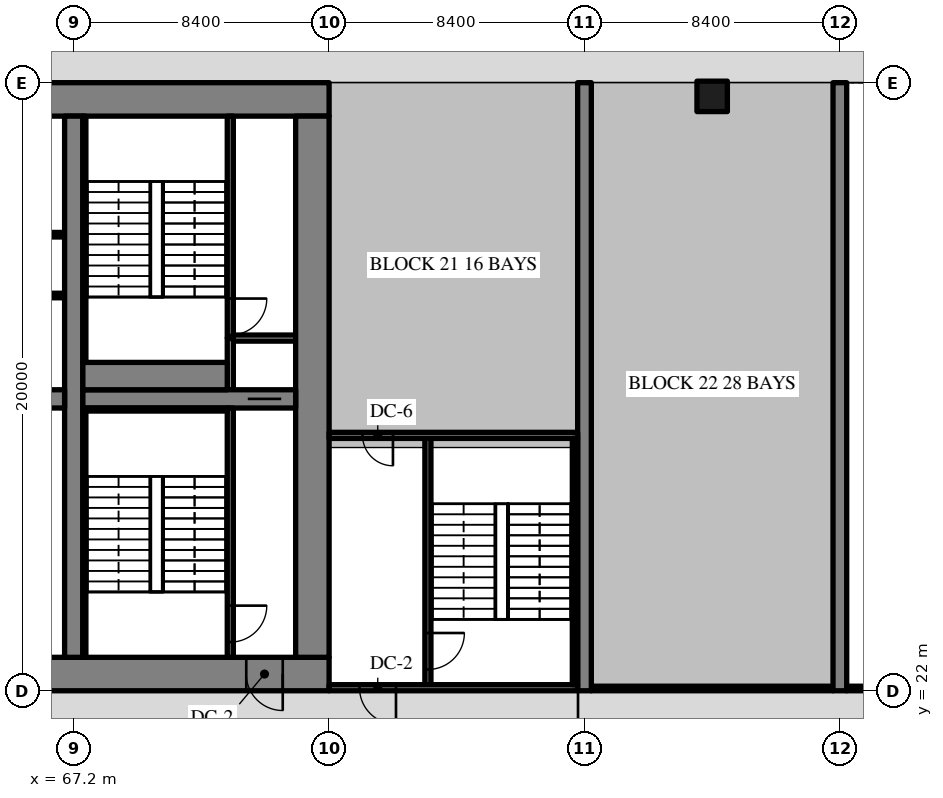
"""IFC4 building model, lengths in metres.
Left out: names, types, materials, properties, quantities, classifications, styles, units other than length and angle.
Written with IfcOpenShell. Run it as: python <this file> out.ifc"""

import sys

from ifc_helpers import new_model, si_unit, direction, frame, frame_2d, origin, origin_2d, place, context, subcontext, project, spatial, rectangle, extrude, source, transform, mapped, element, fill, save


model = new_model("IFC4")
c1 = context("Model", 3, precision=1e-05, world=origin(), true_north=direction((0.0, 1.0)))
c2 = subcontext(c1, "Body", "Model", "MODEL_VIEW")
j1 = project(units=[si_unit("LENGTHUNIT", "METRE"), si_unit("PLANEANGLEUNIT", "RADIAN")], contexts=[c1])
p1 = place(None, origin())
s1 = spatial("IfcSite", under=j1, at=p1, CompositionType="ELEMENT")
p2 = place(p1, origin())
s2 = spatial("IfcBuilding", under=s1, at=p2, CompositionType="ELEMENT")
p3 = place(p2, frame((0.0, 0.0, -4.5)))
s3 = spatial("IfcBuildingStorey", under=s2, at=p3, CompositionType="ELEMENT", Elevation=-4.5)
m1 = source(origin(), c2, "Body", "SweptSolid", [
    extrude(rectangle(XDim=50.4, YDim=1.1, at=frame_2d((25.2, 0.0))), origin(), (0.0, 0.0, 1.0), 4.22),
])
p4 = place(p3, frame((25.2, 22.55, 0.0), z_axis=(0.0, 0.0, 1.0), x_axis=(1.0, 0.0, 0.0)))
e1 = element("IfcWall", 1, at=p4, inside=s3, PredefinedType="SHEAR", context=c2, shape_type="MappedRepresentation", body=[
    mapped(m1, transform((0.0, 0.0, 0.0), scale=1.0)),
])
m2 = source(origin(), c2, "Body", "SweptSolid", [
    extrude(rectangle(XDim=1.8, YDim=2.1, at=frame_2d((0.9, 1.05))), frame((0.0, 0.56, 0.0), z_axis=(0.0, -1.0, 0.0), x_axis=(1.0, 0.0, 0.0)), (0.0, 0.0, 1.0), 1.12),
])
p5 = place(p4, frame((15.9, 0.0, 0.0)))
e2 = element("IfcOpeningElement", 2, at=p5, cuts=e1, PredefinedType="OPENING", context=c2, shape_type="MappedRepresentation", body=[
    mapped(m2, transform((0.0, 0.0, 0.0), scale=1.0)),
])
m3 = source(origin(), c2, "Body", "SweptSolid", [
    extrude(rectangle(XDim=1.2, YDim=2.1, at=frame_2d((0.6, 1.05))), frame((0.0, 0.56, 0.0), z_axis=(0.0, -1.0, 0.0), x_axis=(1.0, 0.0, 0.0)), (0.0, 0.0, 1.0), 1.12),
])
p6 = place(p4, frame((27.0, 0.0, 0.0)))
e3 = element("IfcOpeningElement", 3, at=p6, cuts=e1, PredefinedType="OPENING", context=c2, shape_type="MappedRepresentation", body=[
    mapped(m3, transform((0.0, 0.0, 0.0), scale=1.0)),
])
m4 = source(origin(), c2, "Body", "SweptSolid", [
    extrude(rectangle(XDim=0.9, YDim=2.1, at=frame_2d((0.45, 1.05))), frame((0.0, 0.56, 0.0), z_axis=(0.0, -1.0, 0.0), x_axis=(1.0, 0.0, 0.0)), (0.0, 0.0, 1.0), 1.12),
])
p7 = place(p4, frame((34.5, 0.0, 0.0)))
e4 = element("IfcOpeningElement", 4, at=p7, cuts=e1, PredefinedType="OPENING", context=c2, shape_type="MappedRepresentation", body=[
    mapped(m4, transform((0.0, 0.0, 0.0), scale=1.0)),
])
p8 = place(p4, frame((31.5, 0.0, 0.0)))
e5 = element("IfcOpeningElement", 5, at=p8, cuts=e1, PredefinedType="OPENING", context=c2, shape_type="MappedRepresentation", body=[
    mapped(m4, transform((0.0, 0.0, 0.0), scale=1.0)),
])
p9 = place(p4, frame((39.75, 0.0, 0.0)))
e6 = element("IfcOpeningElement", 6, at=p9, cuts=e1, PredefinedType="OPENING", context=c2, shape_type="MappedRepresentation", body=[
    mapped(m4, transform((0.0, 0.0, 0.0), scale=1.0)),
])
p10 = place(p4, frame((36.75, 0.0, 0.0)))
e7 = element("IfcOpeningElement", 7, at=p10, cuts=e1, PredefinedType="OPENING", context=c2, shape_type="MappedRepresentation", body=[
    mapped(m4, transform((0.0, 0.0, 0.0), scale=1.0)),
])
p11 = place(p4, frame((6.425, 0.0, 0.0)))
e8 = element("IfcOpeningElement", 8, at=p11, cuts=e1, PredefinedType="OPENING", context=c2, shape_type="MappedRepresentation", body=[
    mapped(m3, transform((0.0, 0.0, 0.0), scale=1.0)),
])
p12 = place(p4, frame((47.675, 0.0, 0.0)))
e9 = element("IfcOpeningElement", 9, at=p12, cuts=e1, PredefinedType="OPENING", context=c2, shape_type="MappedRepresentation", body=[
    mapped(m3, transform((0.0, 0.0, 0.0), scale=1.0)),
])
p13 = place(p3, frame((25.2, 41.45, 0.0), z_axis=(0.0, 0.0, 1.0), x_axis=(1.0, 0.0, 0.0)))
e10 = element("IfcWall", 10, at=p13, inside=s3, PredefinedType="SHEAR", context=c2, shape_type="MappedRepresentation", body=[
    mapped(m1, transform((0.0, 0.0, 0.0), scale=1.0)),
])
m5 = source(origin(), c2, "Body", "SweptSolid", [
    extrude(rectangle(XDim=17.8, YDim=1.1, at=frame_2d((8.9, 0.0))), origin(), (0.0, 0.0, 1.0), 4.22),
])
p14 = place(p3, frame((75.05, 23.1, 0.0), z_axis=(0.0, 0.0, 1.0), x_axis=(0.0, 1.0, 0.0)))
e11 = element("IfcWall", 11, at=p14, inside=s3, PredefinedType="SHEAR", context=c2, shape_type="MappedRepresentation", body=[
    mapped(m5, transform((0.0, 0.0, 0.0), scale=1.0)),
])
m6 = source(origin(), c2, "Body", "SweptSolid", [
    extrude(rectangle(XDim=17.8, YDim=0.6, at=frame_2d((8.9, 0.0))), origin(), (0.0, 0.0, 1.0), 4.22),
])
p15 = place(p3, frame((67.2, 23.1, 0.0), z_axis=(0.0, 0.0, 1.0), x_axis=(0.0, 1.0, 0.0)))
e12 = element("IfcWall", 12, at=p15, inside=s3, PredefinedType="SHEAR", context=c2, shape_type="MappedRepresentation", body=[
    mapped(m6, transform((0.0, 0.0, 0.0), scale=1.0)),
])
m7 = source(origin(), c2, "Body", "SweptSolid", [
    extrude(rectangle(XDim=16.2, YDim=0.6, at=frame_2d((8.1, 0.0))), origin(), (0.0, 0.0, 1.0), 4.22),
])
p16 = place(p3, frame((50.7, 31.6, 0.0), z_axis=(0.0, 0.0, 1.0), x_axis=(1.0, 0.0, 0.0)))
e13 = element("IfcWall", 13, at=p16, inside=s3, PredefinedType="SHEAR", context=c2, shape_type="MappedRepresentation", body=[
    mapped(m7, transform((0.0, 0.0, 0.0), scale=1.0)),
])
m8 = source(origin(), c2, "Body", "SweptSolid", [
    extrude(rectangle(XDim=1.0, YDim=2.1, at=frame_2d((0.5, 1.05))), frame((0.0, 0.31, 0.0), z_axis=(0.0, -1.0, 0.0), x_axis=(1.0, 0.0, 0.0)), (0.0, 0.0, 1.0), 0.62),
])
p17 = place(p16, frame((0.55, 0.0, 0.0)))
e14 = element("IfcOpeningElement", 14, at=p17, cuts=e13, PredefinedType="OPENING", context=c2, shape_type="MappedRepresentation", body=[
    mapped(m8, transform((0.0, 0.0, 0.0), scale=1.0)),
])
m9 = source(origin(), c2, "Body", "SweptSolid", [
    extrude(rectangle(XDim=7.0, YDim=0.6, at=frame_2d((3.5, 0.0))), origin(), (0.0, 0.0, 1.0), 4.22),
])
p18 = place(p3, frame((67.5, 31.6, 0.0), z_axis=(0.0, 0.0, 1.0), x_axis=(1.0, 0.0, 0.0)))
e15 = element("IfcWall", 15, at=p18, inside=s3, PredefinedType="SHEAR", context=c2, shape_type="MappedRepresentation", body=[
    mapped(m9, transform((0.0, 0.0, 0.0), scale=1.0)),
])
m10 = source(origin(), c2, "Body", "SweptSolid", [
    extrude(rectangle(XDim=1.1, YDim=2.1, at=frame_2d((0.55, 1.05))), frame((0.0, 0.31, 0.0), z_axis=(0.0, -1.0, 0.0), x_axis=(1.0, 0.0, 0.0)), (0.0, 0.0, 1.0), 0.62),
])
p19 = place(p18, frame((5.425, 0.0, 0.0)))
e16 = element("IfcOpeningElement", 16, at=p19, cuts=e15, PredefinedType="OPENING", context=c2, shape_type="MappedRepresentation", body=[
    mapped(m10, transform((0.0, 0.0, 0.0), scale=1.0)),
])
m11 = source(origin(), c2, "Body", "SweptSolid", [
    extrude(rectangle(XDim=20.0, YDim=0.45, at=frame_2d((10.0, 0.0))), origin(), (0.0, 0.0, 1.0), 4.22),
])
for number, where, z_axis, x_axis in (
    (17, (84.0, 22.0, 0.0), (0.0, 0.0, 1.0), (0.0, 1.0, 0.0)),
    (18, (92.4, 22.0, 0.0), (0.0, 0.0, 1.0), (0.0, 1.0, 0.0)),
):
    element("IfcWall", number, at=place(p3, frame(where, z_axis=z_axis, x_axis=x_axis)), inside=s3, PredefinedType="SHEAR", context=c2, shape_type="MappedRepresentation", body=[
        mapped(m11, transform((0.0, 0.0, 0.0), scale=1.0)),
    ])
m12 = source(origin(), c2, "Body", "SweptSolid", [
    extrude(rectangle(XDim=1.0, YDim=1.0, at=origin_2d()), origin(), (0.0, 0.0, 1.0), 4.22),
])
p20 = place(p3, frame((88.2, 41.55, 0.0), z_axis=(0.0, 0.0, 1.0), x_axis=(1.0, 0.0, 0.0)))
e19 = element("IfcColumn", 19, at=p20, inside=s3, PredefinedType="COLUMN", context=c2, shape_type="MappedRepresentation", body=[
    mapped(m12, transform((0.0, 0.0, 0.0), scale=1.0)),
])
m13 = source(origin(), c2, "Body", "SweptSolid", [
    extrude(rectangle(XDim=14.1, YDim=0.15, at=frame_2d((7.05, 0.0))), origin(), (0.0, 0.0, 1.0), 4.22),
])
p21 = place(p3, frame((66.9, 35.0, 0.0), z_axis=(0.0, 0.0, 1.0), x_axis=(-1.0, 0.0, 0.0)))
e20 = element("IfcWall", 20, at=p21, inside=s3, PredefinedType="PARTITIONING", context=c2, shape_type="MappedRepresentation", body=[
    mapped(m13, transform((0.0, 0.0, 0.0), scale=1.0)),
])
m14 = source(origin(), c2, "Body", "SweptSolid", [
    extrude(rectangle(XDim=0.9, YDim=2.1, at=frame_2d((0.45, 1.05))), frame((0.0, 0.085, 0.0), z_axis=(0.0, -1.0, 0.0), x_axis=(1.0, 0.0, 0.0)), (0.0, 0.0, 1.0), 0.17),
])
p22 = place(p21, frame((0.952, 0.0, 0.0)))
e21 = element("IfcOpeningElement", 21, at=p22, cuts=e20, PredefinedType="OPENING", context=c2, shape_type="MappedRepresentation", body=[
    mapped(m14, transform((0.0, 0.0, 0.0), scale=1.0)),
])
p23 = place(p21, frame((5.861, 0.0, 0.0)))
e22 = element("IfcOpeningElement", 22, at=p23, cuts=e20, PredefinedType="OPENING", context=c2, shape_type="MappedRepresentation", body=[
    mapped(m14, transform((0.0, 0.0, 0.0), scale=1.0)),
])
p24 = place(p21, frame((11.471, 0.0, 0.0)))
e23 = element("IfcOpeningElement", 23, at=p24, cuts=e20, PredefinedType="OPENING", context=c2, shape_type="MappedRepresentation", body=[
    mapped(m14, transform((0.0, 0.0, 0.0), scale=1.0)),
])
m15 = source(origin(), c2, "Body", "SweptSolid", [
    extrude(rectangle(XDim=16.2, YDim=0.15, at=frame_2d((8.1, 0.0))), origin(), (0.0, 0.0, 1.0), 4.22),
])
p25 = place(p3, frame((66.9, 37.0, 0.0), z_axis=(0.0, 0.0, 1.0), x_axis=(-1.0, 0.0, 0.0)))
e24 = element("IfcWall", 24, at=p25, inside=s3, PredefinedType="PARTITIONING", context=c2, shape_type="MappedRepresentation", body=[
    mapped(m15, transform((0.0, 0.0, 0.0), scale=1.0)),
])
p26 = place(p25, frame((0.765, 0.0, 0.0)))
e25 = element("IfcOpeningElement", 25, at=p26, cuts=e24, PredefinedType="OPENING", context=c2, shape_type="MappedRepresentation", body=[
    mapped(m14, transform((0.0, 0.0, 0.0), scale=1.0)),
])
p27 = place(p25, frame((3.6, 0.0, 0.0)))
e26 = element("IfcOpeningElement", 26, at=p27, cuts=e24, PredefinedType="OPENING", context=c2, shape_type="MappedRepresentation", body=[
    mapped(m14, transform((0.0, 0.0, 0.0), scale=1.0)),
])
p28 = place(p25, frame((9.27, 0.0, 0.0)))
e27 = element("IfcOpeningElement", 27, at=p28, cuts=e24, PredefinedType="OPENING", context=c2, shape_type="MappedRepresentation", body=[
    mapped(m14, transform((0.0, 0.0, 0.0), scale=1.0)),
])
p29 = place(p25, frame((14.535, 0.0, 0.0)))
e28 = element("IfcOpeningElement", 28, at=p29, cuts=e24, PredefinedType="OPENING", context=c2, shape_type="MappedRepresentation", body=[
    mapped(m14, transform((0.0, 0.0, 0.0), scale=1.0)),
])
m16 = source(origin(), c2, "Body", "SweptSolid", [
    extrude(rectangle(XDim=8.2, YDim=0.2, at=frame_2d((4.1, 0.0))), origin(), (0.0, 0.0, 1.0), 4.22),
])
p30 = place(p3, frame((72.35, 23.1, 0.0), z_axis=(0.0, 0.0, 1.0), x_axis=(0.0, 1.0, 0.0)))
e29 = element("IfcWall", 29, at=p30, inside=s3, PredefinedType="SOLIDWALL", context=c2, shape_type="MappedRepresentation", body=[
    mapped(m16, transform((0.0, 0.0, 0.0), scale=1.0)),
])
m17 = source(origin(), c2, "Body", "SweptSolid", [
    extrude(rectangle(XDim=1.2, YDim=2.1, at=frame_2d((0.6, 1.05))), frame((0.0, 0.11, 0.0), z_axis=(0.0, -1.0, 0.0), x_axis=(1.0, 0.0, 0.0)), (0.0, 0.0, 1.0), 0.22),
])
p31 = place(p30, frame((0.5, 0.0, 0.0)))
e30 = element("IfcOpeningElement", 30, at=p31, cuts=e29, PredefinedType="OPENING", context=c2, shape_type="MappedRepresentation", body=[
    mapped(m17, transform((0.0, 0.0, 0.0), scale=1.0)),
])
m18 = source(origin(), c2, "Body", "SweptSolid", [
    extrude(rectangle(XDim=1.7, YDim=0.2, at=frame_2d((0.85, 0.0))), origin(), (0.0, 0.0, 1.0), 4.22),
])
p32 = place(p3, frame((72.35, 31.9, 0.0), z_axis=(0.0, 0.0, 1.0), x_axis=(0.0, 1.0, 0.0)))
e31 = element("IfcWall", 31, at=p32, inside=s3, PredefinedType="SOLIDWALL", context=c2, shape_type="MappedRepresentation", body=[
    mapped(m18, transform((0.0, 0.0, 0.0), scale=1.0)),
])
m19 = source(origin(), c2, "Body", "SweptSolid", [
    extrude(rectangle(XDim=2.05, YDim=0.2, at=frame_2d((1.025, 0.0))), origin(), (0.0, 0.0, 1.0), 4.22),
])
p33 = place(p3, frame((72.45, 33.6, 0.0), z_axis=(0.0, 0.0, 1.0), x_axis=(1.0, 0.0, 0.0)))
e32 = element("IfcWall", 32, at=p33, inside=s3, PredefinedType="SOLIDWALL", context=c2, shape_type="MappedRepresentation", body=[
    mapped(m19, transform((0.0, 0.0, 0.0), scale=1.0)),
])
m20 = source(origin(), c2, "Body", "SweptSolid", [
    extrude(rectangle(XDim=7.3, YDim=0.2, at=frame_2d((3.65, 0.0))), origin(), (0.0, 0.0, 1.0), 4.22),
])
p34 = place(p3, frame((72.35, 33.6, 0.0), z_axis=(0.0, 0.0, 1.0), x_axis=(0.0, 1.0, 0.0)))
e33 = element("IfcWall", 33, at=p34, inside=s3, PredefinedType="SOLIDWALL", context=c2, shape_type="MappedRepresentation", body=[
    mapped(m20, transform((0.0, 0.0, 0.0), scale=1.0)),
])
p35 = place(p34, frame((0.1, 0.0, 0.0)))
e34 = element("IfcOpeningElement", 34, at=p35, cuts=e33, PredefinedType="OPENING", context=c2, shape_type="MappedRepresentation", body=[
    mapped(m17, transform((0.0, 0.0, 0.0), scale=1.0)),
])
m21 = source(origin(), c2, "Body", "SweptSolid", [
    extrude(rectangle(XDim=8.3, YDim=0.2, at=frame_2d((4.15, 0.0))), origin(), (0.0, 0.0, 1.0), 4.22),
])
p36 = place(p3, frame((78.85, 22.1, 0.0), z_axis=(0.0, 0.0, 1.0), x_axis=(0.0, 1.0, 0.0)))
e35 = element("IfcWall", 35, at=p36, inside=s3, PredefinedType="SOLIDWALL", context=c2, shape_type="MappedRepresentation", body=[
    mapped(m21, transform((0.0, 0.0, 0.0), scale=1.0)),
])
p37 = place(p36, frame((0.6, 0.0, 0.0)))
e36 = element("IfcOpeningElement", 36, at=p37, cuts=e35, PredefinedType="OPENING", context=c2, shape_type="MappedRepresentation", body=[
    mapped(m17, transform((0.0, 0.0, 0.0), scale=1.0)),
])
m22 = source(origin(), c2, "Body", "SweptSolid", [
    extrude(rectangle(XDim=8.175, YDim=0.2, at=frame_2d((4.087, 0.0))), origin(), (0.0, 0.0, 1.0), 4.22),
])
p38 = place(p3, frame((83.775, 22.1, 0.0), z_axis=(0.0, 0.0, 1.0), x_axis=(-1.0, 0.0, 0.0)))
e37 = element("IfcWall", 37, at=p38, inside=s3, PredefinedType="SOLIDWALL", context=c2, shape_type="MappedRepresentation", body=[
    mapped(m22, transform((0.0, 0.0, 0.0), scale=1.0)),
])
p39 = place(p38, frame((5.975, 0.0, 0.0)))
e38 = element("IfcOpeningElement", 38, at=p39, cuts=e37, PredefinedType="OPENING", context=c2, shape_type="MappedRepresentation", body=[
    mapped(m17, transform((0.0, 0.0, 0.0), scale=1.0)),
])
p40 = place(p3, frame((83.775, 30.4, 0.0), z_axis=(0.0, 0.0, 1.0), x_axis=(-1.0, 0.0, 0.0)))
e39 = element("IfcWall", 39, at=p40, inside=s3, PredefinedType="SOLIDWALL", context=c2, shape_type="MappedRepresentation", body=[
    mapped(m22, transform((0.0, 0.0, 0.0), scale=1.0)),
])
m23 = source(origin(), c2, "Body", "SweptSolid", [
    extrude(rectangle(XDim=1.0, YDim=2.1, at=frame_2d((0.5, 1.05))), frame((0.0, 0.11, 0.0), z_axis=(0.0, -1.0, 0.0), x_axis=(1.0, 0.0, 0.0)), (0.0, 0.0, 1.0), 0.22),
])
p41 = place(p40, frame((6.075, 0.0, 0.0)))
e40 = element("IfcOpeningElement", 40, at=p41, cuts=e39, PredefinedType="OPENING", context=c2, shape_type="MappedRepresentation", body=[
    mapped(m23, transform((0.0, 0.0, 0.0), scale=1.0)),
])
m24 = source(origin(), c2, "Body", "SweptSolid", [
    extrude(rectangle(XDim=4.75, YDim=0.1, at=frame_2d((2.375, 0.0))), origin(), (0.0, 0.0, 1.0), 4.22),
])
p42 = place(p3, frame((67.5, 31.25, 0.0), z_axis=(0.0, 0.0, 1.0), x_axis=(1.0, 0.0, 0.0)))
e41 = element("IfcWall", 41, at=p42, inside=s3, PredefinedType="SOLIDWALL", context=c2, shape_type="MappedRepresentation", body=[
    mapped(m24, transform((0.0, 0.0, 0.0), scale=1.0)),
])
m25 = source(origin(), c2, "Body", "SweptSolid", [
    extrude(rectangle(XDim=8.1, YDim=0.1, at=frame_2d((4.05, 0.0))), origin(), (0.0, 0.0, 1.0), 4.22),
])
p43 = place(p3, frame((67.55, 23.1, 0.0), z_axis=(0.0, 0.0, 1.0), x_axis=(0.0, 1.0, 0.0)))
e42 = element("IfcWall", 42, at=p43, inside=s3, PredefinedType="SOLIDWALL", context=c2, shape_type="MappedRepresentation", body=[
    mapped(m25, transform((0.0, 0.0, 0.0), scale=1.0)),
])
m26 = source(origin(), c2, "Body", "SweptSolid", [
    extrude(rectangle(XDim=4.75, YDim=0.9, at=frame_2d((2.375, 0.0))), origin(), (0.0, 0.0, 1.0), 4.22),
])
p44 = place(p3, frame((67.5, 32.35, 0.0), z_axis=(0.0, 0.0, 1.0), x_axis=(1.0, 0.0, 0.0)))
e43 = element("IfcWall", 43, at=p44, inside=s3, PredefinedType="SOLIDWALL", context=c2, shape_type="MappedRepresentation", body=[
    mapped(m26, transform((0.0, 0.0, 0.0), scale=1.0)),
])
p45 = place(p3, frame((67.55, 32.8, 0.0), z_axis=(0.0, 0.0, 1.0), x_axis=(0.0, 1.0, 0.0)))
e44 = element("IfcWall", 44, at=p45, inside=s3, PredefinedType="SOLIDWALL", context=c2, shape_type="MappedRepresentation", body=[
    mapped(m25, transform((0.0, 0.0, 0.0), scale=1.0)),
])
m27 = source(origin(), c2, "Body", "SweptSolid", [
    extrude(rectangle(XDim=8.1, YDim=0.175, at=frame_2d((4.05, 0.0))), origin(), (0.0, 0.0, 1.0), 4.22),
])
p46 = place(p3, frame((83.688, 22.2, 0.0), z_axis=(0.0, 0.0, 1.0), x_axis=(0.0, 1.0, 0.0)))
e45 = element("IfcWall", 45, at=p46, inside=s3, PredefinedType="SOLIDWALL", context=c2, shape_type="MappedRepresentation", body=[
    mapped(m27, transform((0.0, 0.0, 0.0), scale=1.0)),
])
m28 = source(origin(), c2, "Body", "SweptSolid", [
    extrude(rectangle(XDim=7.95, YDim=0.15, at=frame_2d((3.975, 0.0))), origin(), (0.0, 0.0, 1.0), 4.22),
])
p47 = place(p3, frame((84.225, 22.075, 0.0), z_axis=(0.0, 0.0, 1.0), x_axis=(1.0, 0.0, 0.0)))
e46 = element("IfcWall", 46, at=p47, inside=s3, PredefinedType="PARTITIONING", context=c2, shape_type="MappedRepresentation", body=[
    mapped(m28, transform((0.0, 0.0, 0.0), scale=1.0)),
])
m29 = source(origin(), c2, "Body", "SweptSolid", [
    extrude(rectangle(XDim=7.725, YDim=0.15, at=frame_2d((3.863, 0.0))), origin(), (0.0, 0.0, 1.0), 4.22),
])
p48 = place(p3, frame((92.625, 22.075, 0.0), z_axis=(0.0, 0.0, 1.0), x_axis=(1.0, 0.0, 0.0)))
e47 = element("IfcWall", 47, at=p48, inside=s3, PredefinedType="PARTITIONING", context=c2, shape_type="MappedRepresentation", body=[
    mapped(m29, transform((0.0, 0.0, 0.0), scale=1.0)),
])
m30 = source(origin(), c2, "Body", "SweptSolid", [
    extrude(rectangle(XDim=1.2, YDim=2.1, at=frame_2d((0.6, 1.05))), frame((0.0, 0.025, 0.0), z_axis=(0.0, -1.0, 0.0), x_axis=(1.0, 0.0, 0.0)), (0.0, 0.0, 1.0), 0.05),
])
p49 = place(p31, origin())
e48 = element("IfcDoor", 48, at=p49, inside=s3, OperationType="SINGLE_SWING_RIGHT", PredefinedType="DOOR", context=c2, shape_type="MappedRepresentation", body=[
    mapped(m30, transform((0.0, 0.0, 0.0), scale=1.0)),
])
fill(e30, e48)
m31 = source(origin(), c2, "Body", "SweptSolid", [
    extrude(rectangle(XDim=1.2, YDim=2.1, at=frame_2d((0.6, 1.05))), frame((0.0, 0.325, 0.0), z_axis=(0.0, -1.0, 0.0), x_axis=(1.0, 0.0, 0.0)), (0.0, 0.0, 1.0), 0.05),
])
p50 = place(p12, origin())
e49 = element("IfcDoor", 49, at=p50, inside=s3, OperationType="SINGLE_SWING_RIGHT", PredefinedType="DOOR", context=c2, shape_type="MappedRepresentation", body=[
    mapped(m31, transform((0.0, 0.0, 0.0), scale=1.0)),
])
fill(e9, e49)
m32 = source(origin(), c2, "Body", "SweptSolid", [
    extrude(rectangle(XDim=1.1, YDim=2.1, at=frame_2d((0.55, 1.05))), frame((0.0, 0.025, 0.0), z_axis=(0.0, -1.0, 0.0), x_axis=(1.0, 0.0, 0.0)), (0.0, 0.0, 1.0), 0.05),
])
p51 = place(p19, origin())
e50 = element("IfcDoor", 50, at=p51, inside=s3, OperationType="SLIDING_TO_RIGHT", PredefinedType="DOOR", context=c2, shape_type="MappedRepresentation", body=[
    mapped(m32, transform((0.0, 0.0, 0.0), scale=1.0)),
])
fill(e16, e50)
p52 = place(p35, origin())
e51 = element("IfcDoor", 51, at=p52, inside=s3, OperationType="SINGLE_SWING_RIGHT", PredefinedType="DOOR", context=c2, shape_type="MappedRepresentation", body=[
    mapped(m30, transform((0.0, 0.0, 0.0), scale=1.0)),
])
fill(e34, e51)
p53 = place(p37, origin())
e52 = element("IfcDoor", 52, at=p53, inside=s3, OperationType="SINGLE_SWING_RIGHT", PredefinedType="DOOR", context=c2, shape_type="MappedRepresentation", body=[
    mapped(m30, transform((0.0, 0.0, 0.0), scale=1.0)),
])
fill(e36, e52)
p54 = place(p39, origin())
e53 = element("IfcDoor", 53, at=p54, inside=s3, OperationType="SINGLE_SWING_LEFT", PredefinedType="DOOR", context=c2, shape_type="MappedRepresentation", body=[
    mapped(m30, transform((0.0, 0.0, 0.0), scale=1.0)),
])
fill(e38, e53)
m33 = source(origin(), c2, "Body", "SweptSolid", [
    extrude(rectangle(XDim=1.0, YDim=2.1, at=frame_2d((0.5, 1.05))), frame((0.0, 0.025, 0.0), z_axis=(0.0, -1.0, 0.0), x_axis=(1.0, 0.0, 0.0)), (0.0, 0.0, 1.0), 0.05),
])
p55 = place(p41, origin())
e54 = element("IfcDoor", 54, at=p55, inside=s3, OperationType="SINGLE_SWING_LEFT", PredefinedType="DOOR", context=c2, shape_type="MappedRepresentation", body=[
    mapped(m33, transform((0.0, 0.0, 0.0), scale=1.0)),
])
fill(e40, e54)
save(model, sys.argv[1])
